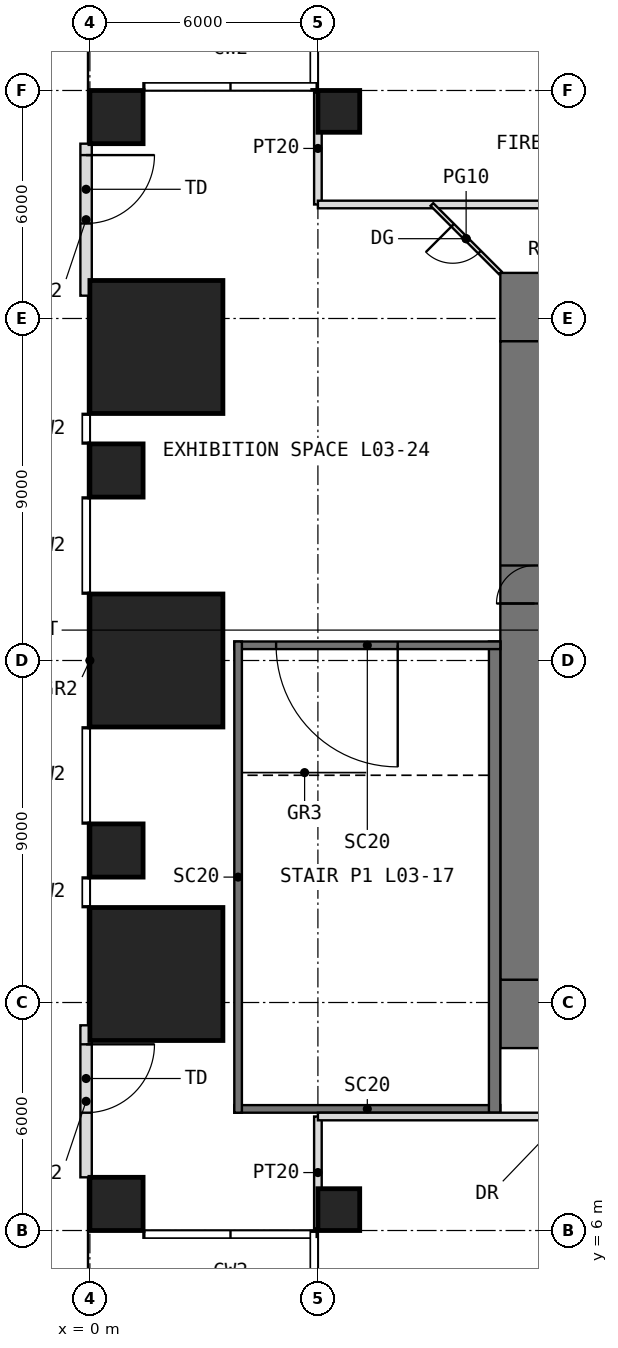
"""IFC4 building model, lengths in metres.
Left out: names, types, materials, properties, quantities, classifications, styles, units other than length and angle.
Written with IfcOpenShell. Run it as: python <this file> out.ifc"""

import sys

from ifc_helpers import new_model, si_unit, direction, frame, frame_2d, origin, origin_2d, place, context, subcontext, project, spatial, rectangle, extrude, element, fill, save


model = new_model("IFC4")
c1 = context("Model", 3, precision=1e-05, world=origin(), true_north=direction((0.0, 1.0)))
c2 = subcontext(c1, "Body", "Model", "MODEL_VIEW")
j1 = project(units=[si_unit("LENGTHUNIT", "METRE"), si_unit("PLANEANGLEUNIT", "RADIAN")], contexts=[c1])
p1 = place(None, origin())
s1 = spatial("IfcSite", under=j1, at=p1, CompositionType="ELEMENT")
p2 = place(p1, origin())
s2 = spatial("IfcBuilding", under=s1, at=p2, CompositionType="ELEMENT")
p3 = place(p2, frame((0.0, 0.0, 18.0)))
s3 = spatial("IfcBuildingStorey", under=s2, at=p3, CompositionType="ELEMENT", Elevation=18.0)
p4 = place(p3, frame((0.7, 6.7, 0.0), z_axis=(0.0, 0.0, 1.0), x_axis=(1.0, 0.0, 0.0)))
e1 = element("IfcColumn", 1, at=p4, inside=s3, PredefinedType="COLUMN", context=c2, shape_type="SweptSolid", body=[
    extrude(rectangle(XDim=1.4, YDim=1.4, at=origin_2d()), origin(), (0.0, 0.0, 1.0), 4.5),
])
p5 = place(p3, frame((6.55, 6.55, 0.0), z_axis=(0.0, 0.0, 1.0), x_axis=(1.0, 0.0, 0.0)))
e2 = element("IfcColumn", 2, at=p5, inside=s3, PredefinedType="COLUMN", context=c2, shape_type="SweptSolid", body=[
    extrude(rectangle(XDim=1.1, YDim=1.1, at=origin_2d()), origin(), (0.0, 0.0, 1.0), 4.5),
])
p6 = place(p3, frame((1.75, 12.75, 0.0), z_axis=(0.0, 0.0, 1.0), x_axis=(1.0, 0.0, 0.0)))
e3 = element("IfcColumn", 3, at=p6, inside=s3, PredefinedType="COLUMN", context=c2, shape_type="SweptSolid", body=[
    extrude(rectangle(XDim=3.5, YDim=3.5, at=origin_2d()), origin(), (0.0, 0.0, 1.0), 4.5),
])
p7 = place(p3, frame((0.7, 16.0, 0.0), z_axis=(0.0, 0.0, 1.0), x_axis=(1.0, 0.0, 0.0)))
e4 = element("IfcColumn", 4, at=p7, inside=s3, PredefinedType="COLUMN", context=c2, shape_type="SweptSolid", body=[
    extrude(rectangle(XDim=1.4, YDim=1.4, at=origin_2d()), origin(), (0.0, 0.0, 1.0), 4.5),
])
p8 = place(p3, frame((1.75, 21.0, 0.0), z_axis=(0.0, 0.0, 1.0), x_axis=(1.0, 0.0, 0.0)))
e5 = element("IfcColumn", 5, at=p8, inside=s3, PredefinedType="COLUMN", context=c2, shape_type="SweptSolid", body=[
    extrude(rectangle(XDim=3.5, YDim=3.5, at=origin_2d()), origin(), (0.0, 0.0, 1.0), 4.5),
])
p9 = place(p3, frame((0.7, 26.0, 0.0), z_axis=(0.0, 0.0, 1.0), x_axis=(1.0, 0.0, 0.0)))
e6 = element("IfcColumn", 6, at=p9, inside=s3, PredefinedType="COLUMN", context=c2, shape_type="SweptSolid", body=[
    extrude(rectangle(XDim=1.4, YDim=1.4, at=origin_2d()), origin(), (0.0, 0.0, 1.0), 4.5),
])
p10 = place(p3, frame((1.75, 29.25, 0.0), z_axis=(0.0, 0.0, 1.0), x_axis=(1.0, 0.0, 0.0)))
e7 = element("IfcColumn", 7, at=p10, inside=s3, PredefinedType="COLUMN", context=c2, shape_type="SweptSolid", body=[
    extrude(rectangle(XDim=3.5, YDim=3.5, at=origin_2d()), origin(), (0.0, 0.0, 1.0), 4.5),
])
p11 = place(p3, frame((0.7, 35.3, 0.0), z_axis=(0.0, 0.0, 1.0), x_axis=(1.0, 0.0, 0.0)))
e8 = element("IfcColumn", 8, at=p11, inside=s3, PredefinedType="COLUMN", context=c2, shape_type="SweptSolid", body=[
    extrude(rectangle(XDim=1.4, YDim=1.4, at=origin_2d()), origin(), (0.0, 0.0, 1.0), 4.5),
])
p12 = place(p3, frame((6.55, 35.45, 0.0), z_axis=(0.0, 0.0, 1.0), x_axis=(1.0, 0.0, 0.0)))
e9 = element("IfcColumn", 9, at=p12, inside=s3, PredefinedType="COLUMN", context=c2, shape_type="SweptSolid", body=[
    extrude(rectangle(XDim=1.1, YDim=1.1, at=origin_2d()), origin(), (0.0, 0.0, 1.0), 4.5),
])
p13 = place(p3, frame((-0.1, 34.6, 0.0), z_axis=(0.0, 0.0, 1.0), x_axis=(0.0, -1.0, 0.0)))
e10 = element("IfcWall", 10, at=p13, inside=s3, PredefinedType="USERDEFINED", context=c2, shape_type="SweptSolid", body=[
    extrude(rectangle(XDim=4.0, YDim=0.3, at=frame_2d((2.0, 0.0))), origin(), (0.0, 0.0, 1.0), 4.25),
])
p14 = place(p13, frame((0.3, 0.0, 0.0)))
e11 = element("IfcOpeningElement", 11, at=p14, cuts=e10, PredefinedType="OPENING", context=c2, shape_type="SweptSolid", body=[
    extrude(rectangle(XDim=1.8, YDim=2.7, at=frame_2d((0.9, 1.35))), frame((0.0, 0.16, 0.0), z_axis=(0.0, -1.0, 0.0), x_axis=(1.0, 0.0, 0.0)), (0.0, 0.0, 1.0), 0.32),
])
p15 = place(p3, frame((-0.1, 11.4, 0.0), z_axis=(0.0, 0.0, 1.0), x_axis=(0.0, -1.0, 0.0)))
e12 = element("IfcWall", 12, at=p15, inside=s3, PredefinedType="USERDEFINED", context=c2, shape_type="SweptSolid", body=[
    extrude(rectangle(XDim=4.0, YDim=0.3, at=frame_2d((2.0, 0.0))), origin(), (0.0, 0.0, 1.0), 4.25),
])
p16 = place(p15, frame((0.5, 0.0, 0.0)))
e13 = element("IfcOpeningElement", 13, at=p16, cuts=e12, PredefinedType="OPENING", context=c2, shape_type="SweptSolid", body=[
    extrude(rectangle(XDim=1.8, YDim=2.7, at=frame_2d((0.9, 1.35))), frame((0.0, 0.16, 0.0), z_axis=(0.0, -1.0, 0.0), x_axis=(1.0, 0.0, 0.0)), (0.0, 0.0, 1.0), 0.32),
])
p17 = place(p3, frame((10.8, 11.7, -0.2), z_axis=(0.0, 0.0, 1.0), x_axis=(1.0, 0.0, 0.0)))
e14 = element("IfcWall", 14, at=p17, inside=s3, PredefinedType="SHEAR", context=c2, shape_type="SweptSolid", body=[
    extrude(rectangle(XDim=20.4, YDim=1.8, at=frame_2d((10.2, 0.0))), origin(), (0.0, 0.0, 1.0), 4.65),
])
p18 = place(p17, frame((9.2, 0.0, 0.2)))
e15 = element("IfcOpeningElement", 15, at=p18, cuts=e14, PredefinedType="OPENING", context=c2, shape_type="SweptSolid", body=[
    extrude(rectangle(XDim=2.0, YDim=2.2, at=frame_2d((1.0, 1.1))), frame((0.0, 0.91, 0.0), z_axis=(0.0, -1.0, 0.0), x_axis=(1.0, 0.0, 0.0)), (0.0, 0.0, 1.0), 1.82),
])
p19 = place(p3, frame((10.8, 30.3, -0.2), z_axis=(0.0, 0.0, 1.0), x_axis=(1.0, 0.0, 0.0)))
e16 = element("IfcWall", 16, at=p19, inside=s3, PredefinedType="SHEAR", context=c2, shape_type="SweptSolid", body=[
    extrude(rectangle(XDim=20.4, YDim=1.8, at=frame_2d((10.2, 0.0))), origin(), (0.0, 0.0, 1.0), 4.65),
])
p20 = place(p19, frame((9.2, 0.0, 0.2)))
e17 = element("IfcOpeningElement", 17, at=p20, cuts=e16, PredefinedType="OPENING", context=c2, shape_type="SweptSolid", body=[
    extrude(rectangle(XDim=2.0, YDim=2.2, at=frame_2d((1.0, 1.1))), frame((0.0, 0.91, 0.0), z_axis=(0.0, -1.0, 0.0), x_axis=(1.0, 0.0, 0.0)), (0.0, 0.0, 1.0), 1.82),
])
p21 = place(p3, frame((11.7, 12.6, -0.2), z_axis=(0.0, 0.0, 1.0), x_axis=(0.0, 1.0, 0.0)))
e18 = element("IfcWall", 18, at=p21, inside=s3, PredefinedType="SHEAR", context=c2, shape_type="SweptSolid", body=[
    extrude(rectangle(XDim=16.8, YDim=1.8, at=frame_2d((8.4, 0.0))), origin(), (0.0, 0.0, 1.0), 4.65),
])
p22 = place(p21, frame((9.9, 0.0, 0.2)))
e19 = element("IfcOpeningElement", 19, at=p22, cuts=e18, PredefinedType="OPENING", context=c2, shape_type="SweptSolid", body=[
    extrude(rectangle(XDim=1.0, YDim=2.2, at=frame_2d((0.5, 1.1))), frame((0.0, 0.91, 0.0), z_axis=(0.0, -1.0, 0.0), x_axis=(1.0, 0.0, 0.0)), (0.0, 0.0, 1.0), 1.82),
])
p23 = place(p3, frame((3.8, 9.2, -0.2), z_axis=(0.0, 0.0, 1.0), x_axis=(1.0, 0.0, 0.0)))
e20 = element("IfcWall", 20, at=p23, inside=s3, PredefinedType="SOLIDWALL", context=c2, shape_type="SweptSolid", body=[
    extrude(rectangle(XDim=7.0, YDim=0.2, at=frame_2d((3.5, 0.0))), origin(), (0.0, 0.0, 1.0), 4.65),
])
p24 = place(p3, frame((10.65, 9.1, -0.2), z_axis=(0.0, 0.0, 1.0), x_axis=(0.0, 1.0, 0.0)))
e21 = element("IfcWall", 21, at=p24, inside=s3, PredefinedType="SOLIDWALL", context=c2, shape_type="SweptSolid", body=[
    extrude(rectangle(XDim=12.4, YDim=0.3, at=frame_2d((6.2, 0.0))), origin(), (0.0, 0.0, 1.0), 4.65),
])
p25 = place(p3, frame((10.8, 21.4, -0.2), z_axis=(0.0, 0.0, 1.0), x_axis=(-1.0, 0.0, 0.0)))
e22 = element("IfcWall", 22, at=p25, inside=s3, PredefinedType="SOLIDWALL", context=c2, shape_type="SweptSolid", body=[
    extrude(rectangle(XDim=7.0, YDim=0.2, at=frame_2d((3.5, 0.0))), origin(), (0.0, 0.0, 1.0), 4.65),
])
p26 = place(p25, frame((2.7, 0.0, 0.2)))
e23 = element("IfcOpeningElement", 23, at=p26, cuts=e22, PredefinedType="OPENING", context=c2, shape_type="SweptSolid", body=[
    extrude(rectangle(XDim=3.2, YDim=2.4, at=frame_2d((1.6, 1.2))), frame((0.0, 0.11, 0.0), z_axis=(0.0, -1.0, 0.0), x_axis=(1.0, 0.0, 0.0)), (0.0, 0.0, 1.0), 0.22),
])
p27 = place(p3, frame((3.9, 21.5, -0.2), z_axis=(0.0, 0.0, 1.0), x_axis=(0.0, -1.0, 0.0)))
e24 = element("IfcWall", 24, at=p27, inside=s3, PredefinedType="SOLIDWALL", context=c2, shape_type="SweptSolid", body=[
    extrude(rectangle(XDim=12.4, YDim=0.2, at=frame_2d((6.2, 0.0))), origin(), (0.0, 0.0, 1.0), 4.65),
])
p28 = place(p3, frame((6.0, 6.05, 0.0), z_axis=(0.0, 0.0, 1.0), x_axis=(0.0, 1.0, 0.0)))
e25 = element("IfcWall", 25, at=p28, inside=s3, PredefinedType="PARTITIONING", context=c2, shape_type="SweptSolid", body=[
    extrude(rectangle(XDim=2.95, YDim=0.2, at=frame_2d((1.475, 0.0))), origin(), (0.0, 0.0, 1.0), 3.63),
])
p29 = place(p3, frame((6.0, 9.0, 0.0), z_axis=(0.0, 0.0, 1.0), x_axis=(1.0, 0.0, 0.0)))
e26 = element("IfcWall", 26, at=p29, inside=s3, PredefinedType="PARTITIONING", context=c2, shape_type="SweptSolid", body=[
    extrude(rectangle(XDim=13.0, YDim=0.2, at=frame_2d((6.5, 0.0))), origin(), (0.0, 0.0, 1.0), 4.25),
])
p30 = place(p29, frame((6.0, 0.0, 0.0)))
e27 = element("IfcOpeningElement", 27, at=p30, cuts=e26, PredefinedType="OPENING", context=c2, shape_type="SweptSolid", body=[
    extrude(rectangle(XDim=1.0, YDim=2.2, at=frame_2d((0.5, 1.1))), frame((0.0, 0.11, 0.0), z_axis=(0.0, -1.0, 0.0), x_axis=(1.0, 0.0, 0.0)), (0.0, 0.0, 1.0), 0.22),
])
p31 = place(p3, frame((6.0, 33.0, 0.0), z_axis=(0.0, 0.0, 1.0), x_axis=(0.0, 1.0, 0.0)))
e28 = element("IfcWall", 28, at=p31, inside=s3, PredefinedType="PARTITIONING", context=c2, shape_type="SweptSolid", body=[
    extrude(rectangle(XDim=2.95, YDim=0.2, at=frame_2d((1.475, 0.0))), origin(), (0.0, 0.0, 1.0), 3.63),
])
p32 = place(p3, frame((6.0, 33.0, 0.0), z_axis=(0.0, 0.0, 1.0), x_axis=(1.0, 0.0, 0.0)))
e29 = element("IfcWall", 29, at=p32, inside=s3, PredefinedType="PARTITIONING", context=c2, shape_type="SweptSolid", body=[
    extrude(rectangle(XDim=13.0, YDim=0.2, at=frame_2d((6.5, 0.0))), origin(), (0.0, 0.0, 1.0), 4.25),
])
p33 = place(p32, frame((10.0, 0.0, 0.0)))
e30 = element("IfcOpeningElement", 30, at=p33, cuts=e29, PredefinedType="OPENING", context=c2, shape_type="SweptSolid", body=[
    extrude(rectangle(XDim=1.0, YDim=2.2, at=frame_2d((0.5, 1.1))), frame((0.0, 0.11, 0.0), z_axis=(0.0, -1.0, 0.0), x_axis=(1.0, 0.0, 0.0)), (0.0, 0.0, 1.0), 0.22),
])
p34 = place(p3, frame((10.8, 31.2, 0.0), z_axis=(0.0, 0.0, 1.0), x_axis=(-0.707106781187, 0.707106781187, 0.0)))
e31 = element("IfcWall", 31, at=p34, inside=s3, PredefinedType="PARTITIONING", context=c2, shape_type="SweptSolid", body=[
    extrude(rectangle(XDim=2.546, YDim=0.1, at=frame_2d((1.273, 0.0))), origin(), (0.0, 0.0, 1.0), 4.25),
])
p35 = place(p34, frame((0.773, 0.0, 0.0)))
e32 = element("IfcOpeningElement", 32, at=p35, cuts=e31, PredefinedType="OPENING", context=c2, shape_type="SweptSolid", body=[
    extrude(rectangle(XDim=1.0, YDim=2.4, at=frame_2d((0.5, 1.2))), frame((0.0, 0.06, 0.0), z_axis=(0.0, -1.0, 0.0), x_axis=(1.0, 0.0, 0.0)), (0.0, 0.0, 1.0), 0.12),
])
p36 = place(p14, origin())
e33 = element("IfcDoor", 33, at=p36, inside=s3, OperationType="DOUBLE_DOOR_SINGLE_SWING", PredefinedType="DOOR", context=c2, shape_type="SweptSolid", body=[
    extrude(rectangle(XDim=1.8, YDim=2.7, at=frame_2d((0.9, 1.35))), frame((0.0, 0.025, 0.0), z_axis=(0.0, -1.0, 0.0), x_axis=(1.0, 0.0, 0.0)), (0.0, 0.0, 1.0), 0.05),
])
fill(e11, e33)
p37 = place(p16, origin())
e34 = element("IfcDoor", 34, at=p37, inside=s3, OperationType="DOUBLE_DOOR_SINGLE_SWING", PredefinedType="DOOR", context=c2, shape_type="SweptSolid", body=[
    extrude(rectangle(XDim=1.8, YDim=2.7, at=frame_2d((0.9, 1.35))), frame((0.0, 0.025, 0.0), z_axis=(0.0, -1.0, 0.0), x_axis=(1.0, 0.0, 0.0)), (0.0, 0.0, 1.0), 0.05),
])
fill(e13, e34)
p38 = place(p22, origin())
e35 = element("IfcDoor", 35, at=p38, inside=s3, OperationType="SINGLE_SWING_LEFT", PredefinedType="DOOR", context=c2, shape_type="SweptSolid", body=[
    extrude(rectangle(XDim=1.0, YDim=2.2, at=frame_2d((0.5, 1.1))), frame((0.0, 0.025, 0.0), z_axis=(0.0, -1.0, 0.0), x_axis=(1.0, 0.0, 0.0)), (0.0, 0.0, 1.0), 0.05),
])
fill(e19, e35)
p39 = place(p26, origin())
e36 = element("IfcDoor", 36, at=p39, inside=s3, OperationType="DOUBLE_DOOR_SINGLE_SWING", PredefinedType="DOOR", context=c2, shape_type="SweptSolid", body=[
    extrude(rectangle(XDim=3.2, YDim=2.4, at=frame_2d((1.6, 1.2))), frame((0.0, 0.025, 0.0), z_axis=(0.0, -1.0, 0.0), x_axis=(1.0, 0.0, 0.0)), (0.0, 0.0, 1.0), 0.05),
])
fill(e23, e36)
p40 = place(p35, origin())
e37 = element("IfcDoor", 37, at=p40, inside=s3, OperationType="SINGLE_SWING_RIGHT", PredefinedType="DOOR", context=c2, shape_type="SweptSolid", body=[
    extrude(rectangle(XDim=1.0, YDim=2.4, at=frame_2d((0.5, 1.2))), frame((0.0, 0.025, 0.0), z_axis=(0.0, -1.0, 0.0), x_axis=(1.0, 0.0, 0.0)), (0.0, 0.0, 1.0), 0.05),
])
fill(e32, e37)
save(model, sys.argv[1])
